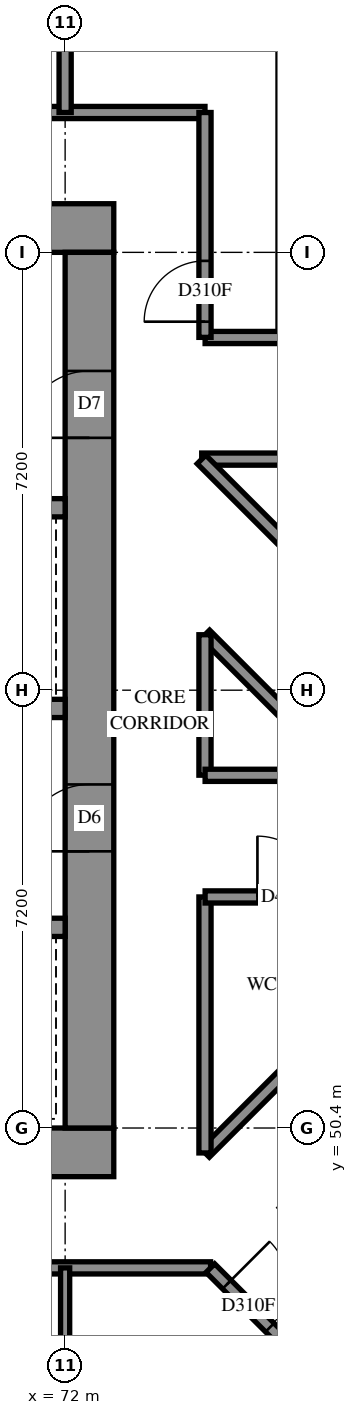
"""IFC4 building model, lengths in metres.
Left out: names, types, materials, properties, quantities, classifications, styles, units other than length and angle.
Written with IfcOpenShell. Run it as: python <this file> out.ifc"""

import sys

from ifc_helpers import new_model, si_unit, direction, frame, frame_2d, origin, place, context, subcontext, project, spatial, rectangle, extrude, element, fill, save


model = new_model("IFC4")
c1 = context("Model", 3, precision=1e-05, world=origin(), true_north=direction((0.0, 1.0)))
c2 = subcontext(c1, "Body", "Model", "MODEL_VIEW")
j1 = project(units=[si_unit("LENGTHUNIT", "METRE"), si_unit("PLANEANGLEUNIT", "RADIAN")], contexts=[c1])
p1 = place(None, origin())
s1 = spatial("IfcSite", under=j1, at=p1, CompositionType="ELEMENT")
p2 = place(p1, origin())
s2 = spatial("IfcBuilding", under=s1, at=p2, CompositionType="ELEMENT")
p3 = place(p2, frame((0.0, 0.0, 101.6)))
s3 = spatial("IfcBuildingStorey", under=s2, at=p3, CompositionType="ELEMENT", Elevation=101.6)
p4 = place(p3, frame((56.8, 50.0, -0.3), z_axis=(0.0, 0.0, 1.0), x_axis=(1.0, 0.0, 0.0)))
e1 = element("IfcWall", 1, at=p4, inside=s3, PredefinedType="SHEAR", context=c2, shape_type="SweptSolid", body=[
    extrude(rectangle(XDim=16.0, YDim=0.8, at=frame_2d((8.0, 0.0))), origin(), (0.0, 0.0, 1.0), 2.7),
])
p5 = place(p3, frame((56.8, 65.2, -0.3), z_axis=(0.0, 0.0, 1.0), x_axis=(1.0, 0.0, 0.0)))
e2 = element("IfcWall", 2, at=p5, inside=s3, PredefinedType="SHEAR", context=c2, shape_type="SweptSolid", body=[
    extrude(rectangle(XDim=16.0, YDim=0.8, at=frame_2d((8.0, 0.0))), origin(), (0.0, 0.0, 1.0), 2.7),
])
p6 = place(p5, frame((10.8, 0.0, 0.3)))
e3 = element("IfcOpeningElement", 3, at=p6, cuts=e2, PredefinedType="OPENING", context=c2, shape_type="SweptSolid", body=[
    extrude(rectangle(XDim=0.8, YDim=2.1, at=frame_2d((0.4, 1.05))), frame((0.0, 0.41, 0.0), z_axis=(0.0, -1.0, 0.0), x_axis=(1.0, 0.0, 0.0)), (0.0, 0.0, 1.0), 0.82),
])
p7 = place(p3, frame((72.4, 50.4, -0.3), z_axis=(0.0, 0.0, 1.0), x_axis=(0.0, 1.0, 0.0)))
e4 = element("IfcWall", 4, at=p7, inside=s3, PredefinedType="SHEAR", context=c2, shape_type="SweptSolid", body=[
    extrude(rectangle(XDim=14.4, YDim=0.8, at=frame_2d((7.2, 0.0))), origin(), (0.0, 0.0, 1.0), 2.7),
])
p8 = place(p7, frame((4.55, 0.0, 0.3)))
e5 = element("IfcOpeningElement", 5, at=p8, cuts=e4, PredefinedType="OPENING", context=c2, shape_type="SweptSolid", body=[
    extrude(rectangle(XDim=1.1, YDim=2.1, at=frame_2d((0.55, 1.05))), frame((0.0, 0.41, 0.0), z_axis=(0.0, -1.0, 0.0), x_axis=(1.0, 0.0, 0.0)), (0.0, 0.0, 1.0), 0.82),
])
p9 = place(p7, frame((11.35, 0.0, 0.3)))
e6 = element("IfcOpeningElement", 6, at=p9, cuts=e4, PredefinedType="OPENING", context=c2, shape_type="SweptSolid", body=[
    extrude(rectangle(XDim=1.1, YDim=2.1, at=frame_2d((0.55, 1.05))), frame((0.0, 0.41, 0.0), z_axis=(0.0, -1.0, 0.0), x_axis=(1.0, 0.0, 0.0)), (0.0, 0.0, 1.0), 0.82),
])
p10 = place(p3, frame((57.6, 53.7, 0.0), z_axis=(0.0, 0.0, 1.0), x_axis=(1.0, 0.0, 0.0)))
e7 = element("IfcWall", 7, at=p10, inside=s3, PredefinedType="SOLIDWALL", context=c2, shape_type="SweptSolid", body=[
    extrude(rectangle(XDim=14.4, YDim=0.3, at=frame_2d((7.2, 0.0))), origin(), (0.0, 0.0, 1.0), 3.1),
])
p11 = place(p10, frame((1.25, 0.0, 0.0)))
e8 = element("IfcOpeningElement", 8, at=p11, cuts=e7, PredefinedType="OPENING", context=c2, shape_type="SweptSolid", body=[
    extrude(rectangle(XDim=1.1, YDim=2.1, at=frame_2d((0.55, 1.05))), frame((0.0, 0.16, 0.0), z_axis=(0.0, -1.0, 0.0), x_axis=(1.0, 0.0, 0.0)), (0.0, 0.0, 1.0), 0.32),
])
p12 = place(p10, frame((4.85, 0.0, 0.0)))
e9 = element("IfcOpeningElement", 9, at=p12, cuts=e7, PredefinedType="OPENING", context=c2, shape_type="SweptSolid", body=[
    extrude(rectangle(XDim=1.1, YDim=2.1, at=frame_2d((0.55, 1.05))), frame((0.0, 0.16, 0.0), z_axis=(0.0, -1.0, 0.0), x_axis=(1.0, 0.0, 0.0)), (0.0, 0.0, 1.0), 0.32),
])
p13 = place(p10, frame((8.45, 0.0, 0.0)))
e10 = element("IfcOpeningElement", 10, at=p13, cuts=e7, PredefinedType="OPENING", context=c2, shape_type="SweptSolid", body=[
    extrude(rectangle(XDim=1.1, YDim=2.1, at=frame_2d((0.55, 1.05))), frame((0.0, 0.16, 0.0), z_axis=(0.0, -1.0, 0.0), x_axis=(1.0, 0.0, 0.0)), (0.0, 0.0, 1.0), 0.32),
])
p14 = place(p10, frame((12.05, 0.0, 0.0)))
e11 = element("IfcOpeningElement", 11, at=p14, cuts=e7, PredefinedType="OPENING", context=c2, shape_type="SweptSolid", body=[
    extrude(rectangle(XDim=1.1, YDim=2.1, at=frame_2d((0.55, 1.05))), frame((0.0, 0.16, 0.0), z_axis=(0.0, -1.0, 0.0), x_axis=(1.0, 0.0, 0.0)), (0.0, 0.0, 1.0), 0.32),
])
p15 = place(p3, frame((57.6, 57.3, 0.0), z_axis=(0.0, 0.0, 1.0), x_axis=(1.0, 0.0, 0.0)))
e12 = element("IfcWall", 12, at=p15, inside=s3, PredefinedType="SOLIDWALL", context=c2, shape_type="SweptSolid", body=[
    extrude(rectangle(XDim=14.4, YDim=0.3, at=frame_2d((7.2, 0.0))), origin(), (0.0, 0.0, 1.0), 3.1),
])
p16 = place(p15, frame((12.05, 0.0, 0.0)))
e13 = element("IfcOpeningElement", 13, at=p16, cuts=e12, PredefinedType="OPENING", context=c2, shape_type="SweptSolid", body=[
    extrude(rectangle(XDim=1.1, YDim=2.1, at=frame_2d((0.55, 1.05))), frame((0.0, 0.16, 0.0), z_axis=(0.0, -1.0, 0.0), x_axis=(1.0, 0.0, 0.0)), (0.0, 0.0, 1.0), 0.32),
])
p17 = place(p3, frame((64.8, 60.6, 0.0), z_axis=(0.0, 0.0, 1.0), x_axis=(1.0, 0.0, 0.0)))
e14 = element("IfcWall", 14, at=p17, inside=s3, PredefinedType="SOLIDWALL", context=c2, shape_type="SweptSolid", body=[
    extrude(rectangle(XDim=7.2, YDim=0.3, at=frame_2d((3.6, 0.0))), origin(), (0.0, 0.0, 1.0), 3.1),
])
p18 = place(p3, frame((55.3, 48.1, 0.0), z_axis=(0.0, 0.0, 1.0), x_axis=(1.0, 0.0, 0.0)))
e15 = element("IfcWall", 15, at=p18, inside=s3, PredefinedType="PARTITIONING", context=c2, shape_type="SweptSolid", body=[
    extrude(rectangle(XDim=19.092, YDim=0.2, at=frame_2d((9.546, 0.0))), origin(), (0.0, 0.0, 1.0), 3.1),
])
p19 = place(p18, frame((4.6, 0.0, 0.0)))
e16 = element("IfcOpeningElement", 16, at=p19, cuts=e15, PredefinedType="OPENING", context=c2, shape_type="SweptSolid", body=[
    extrude(rectangle(XDim=0.9, YDim=2.1, at=frame_2d((0.45, 1.05))), frame((0.0, 0.11, 0.0), z_axis=(0.0, -1.0, 0.0), x_axis=(1.0, 0.0, 0.0)), (0.0, 0.0, 1.0), 0.22),
])
p20 = place(p18, frame((8.239, 0.0, 0.0)))
e17 = element("IfcOpeningElement", 17, at=p20, cuts=e15, PredefinedType="OPENING", context=c2, shape_type="SweptSolid", body=[
    extrude(rectangle(XDim=0.9, YDim=2.1, at=frame_2d((0.45, 1.05))), frame((0.0, 0.11, 0.0), z_axis=(0.0, -1.0, 0.0), x_axis=(1.0, 0.0, 0.0)), (0.0, 0.0, 1.0), 0.22),
])
p21 = place(p18, frame((13.5, 0.0, 0.0)))
e18 = element("IfcOpeningElement", 18, at=p21, cuts=e15, PredefinedType="OPENING", context=c2, shape_type="SweptSolid", body=[
    extrude(rectangle(XDim=0.9, YDim=2.1, at=frame_2d((0.45, 1.05))), frame((0.0, 0.11, 0.0), z_axis=(0.0, -1.0, 0.0), x_axis=(1.0, 0.0, 0.0)), (0.0, 0.0, 1.0), 0.22),
])
p22 = place(p3, frame((55.3, 67.1, 0.0), z_axis=(0.0, 0.0, 1.0), x_axis=(1.0, 0.0, 0.0)))
e19 = element("IfcWall", 19, at=p22, inside=s3, PredefinedType="PARTITIONING", context=c2, shape_type="SweptSolid", body=[
    extrude(rectangle(XDim=19.0, YDim=0.2, at=frame_2d((9.5, 0.0))), origin(), (0.0, 0.0, 1.0), 3.1),
])
p23 = place(p22, frame((6.199, 0.0, 0.0)))
e20 = element("IfcOpeningElement", 20, at=p23, cuts=e19, PredefinedType="OPENING", context=c2, shape_type="SweptSolid", body=[
    extrude(rectangle(XDim=0.9, YDim=2.1, at=frame_2d((0.45, 1.05))), frame((0.0, 0.11, 0.0), z_axis=(0.0, -1.0, 0.0), x_axis=(1.0, 0.0, 0.0)), (0.0, 0.0, 1.0), 0.22),
])
p24 = place(p22, frame((13.399, 0.0, 0.0)))
e21 = element("IfcOpeningElement", 21, at=p24, cuts=e19, PredefinedType="OPENING", context=c2, shape_type="SweptSolid", body=[
    extrude(rectangle(XDim=0.9, YDim=2.1, at=frame_2d((0.45, 1.05))), frame((0.0, 0.11, 0.0), z_axis=(0.0, -1.0, 0.0), x_axis=(1.0, 0.0, 0.0)), (0.0, 0.0, 1.0), 0.22),
])
p25 = place(p3, frame((74.301, 49.991, 0.0), z_axis=(0.0, 0.0, 1.0), x_axis=(0.7071067812, 0.7071067812, 0.0)))
e22 = element("IfcWall", 22, at=p25, inside=s3, PredefinedType="PARTITIONING", context=c2, shape_type="SweptSolid", body=[
    extrude(rectangle(XDim=5.951, YDim=0.2, at=frame_2d((2.975, 0.0))), origin(), (0.0, 0.0, 1.0), 3.1),
])
p26 = place(p3, frame((74.246, 61.4, 0.0), z_axis=(0.0, 0.0, 1.0), x_axis=(1.0, 0.0, 0.0)))
e23 = element("IfcWall", 23, at=p26, inside=s3, PredefinedType="PARTITIONING", context=c2, shape_type="SweptSolid", body=[
    extrude(rectangle(XDim=4.954, YDim=0.2, at=frame_2d((2.477, 0.0))), origin(), (0.0, 0.0, 1.0), 3.1),
])
p27 = place(p3, frame((74.302, 63.4, 0.0), z_axis=(0.0, 0.0, 1.0), x_axis=(1.0, 0.0, 0.0)))
e24 = element("IfcWall", 24, at=p27, inside=s3, PredefinedType="PARTITIONING", context=c2, shape_type="SweptSolid", body=[
    extrude(rectangle(XDim=4.896, YDim=0.2, at=frame_2d((2.448, 0.0))), origin(), (0.0, 0.0, 1.0), 3.1),
])
p28 = place(p3, frame((74.243, 61.395, 0.0), z_axis=(0.0, 0.0, 1.0), x_axis=(0.7071067812, -0.7071067812, 0.0)))
e25 = element("IfcWall", 25, at=p28, inside=s3, PredefinedType="PARTITIONING", context=c2, shape_type="SweptSolid", body=[
    extrude(rectangle(XDim=4.528, YDim=0.2, at=frame_2d((2.264, 0.0))), origin(), (0.0, 0.0, 1.0), 3.1),
])
p29 = place(p28, frame((2.797, 0.0, 0.0)))
e26 = element("IfcOpeningElement", 26, at=p29, cuts=e25, PredefinedType="OPENING", context=c2, shape_type="SweptSolid", body=[
    extrude(rectangle(XDim=1.0, YDim=2.1, at=frame_2d((0.5, 1.05))), frame((0.0, 0.11, 0.0), z_axis=(0.0, -1.0, 0.0), x_axis=(1.0, 0.0, 0.0)), (0.0, 0.0, 1.0), 0.22),
])
p30 = place(p3, frame((74.388, 48.096, 0.0), z_axis=(0.0, 0.0, 1.0), x_axis=(0.7071067812, -0.7071067812, 0.0)))
e27 = element("IfcWall", 27, at=p30, inside=s3, PredefinedType="PARTITIONING", context=c2, shape_type="SweptSolid", body=[
    extrude(rectangle(XDim=4.452, YDim=0.2, at=frame_2d((2.226, 0.0))), origin(), (0.0, 0.0, 1.0), 3.1),
])
p31 = place(p30, frame((0.382, 0.0, 0.0)))
e28 = element("IfcOpeningElement", 28, at=p31, cuts=e27, PredefinedType="OPENING", context=c2, shape_type="SweptSolid", body=[
    extrude(rectangle(XDim=1.0, YDim=2.1, at=frame_2d((0.5, 1.05))), frame((0.0, 0.11, 0.0), z_axis=(0.0, -1.0, 0.0), x_axis=(1.0, 0.0, 0.0)), (0.0, 0.0, 1.0), 0.22),
])
p32 = place(p3, frame((72.0, 67.1, 0.0), z_axis=(0.0, 0.0, 1.0), x_axis=(0.0, 1.0, 0.0)))
e29 = element("IfcWall", 29, at=p32, inside=s3, PredefinedType="PARTITIONING", context=c2, shape_type="SweptSolid", body=[
    extrude(rectangle(XDim=4.4, YDim=0.2, at=frame_2d((2.2, 0.0))), origin(), (0.0, 0.0, 1.0), 3.1),
])
p33 = place(p3, frame((74.3, 49.99, 0.0), z_axis=(0.0, 0.0, 1.0), x_axis=(0.0, 1.0, 0.0)))
e30 = element("IfcWall", 30, at=p33, inside=s3, PredefinedType="PARTITIONING", context=c2, shape_type="SweptSolid", body=[
    extrude(rectangle(XDim=4.21, YDim=0.2, at=frame_2d((2.105, 0.0))), origin(), (0.0, 0.0, 1.0), 3.1),
])
p34 = place(p3, frame((74.302, 54.2, 0.0), z_axis=(0.0, 0.0, 1.0), x_axis=(1.0, 0.0, 0.0)))
e31 = element("IfcWall", 31, at=p34, inside=s3, PredefinedType="PARTITIONING", context=c2, shape_type="SweptSolid", body=[
    extrude(rectangle(XDim=4.208, YDim=0.2, at=frame_2d((2.104, 0.0))), origin(), (0.0, 0.0, 1.0), 3.1),
])
p35 = place(p34, frame((0.86, 0.0, 0.0)))
e32 = element("IfcOpeningElement", 32, at=p35, cuts=e31, PredefinedType="OPENING", context=c2, shape_type="SweptSolid", body=[
    extrude(rectangle(XDim=1.0, YDim=2.1, at=frame_2d((0.5, 1.05))), frame((0.0, 0.11, 0.0), z_axis=(0.0, -1.0, 0.0), x_axis=(1.0, 0.0, 0.0)), (0.0, 0.0, 1.0), 0.22),
])
p36 = place(p3, frame((74.3, 63.402, 0.0), z_axis=(0.0, 0.0, 1.0), x_axis=(0.0, 1.0, 0.0)))
e33 = element("IfcWall", 33, at=p36, inside=s3, PredefinedType="PARTITIONING", context=c2, shape_type="SweptSolid", body=[
    extrude(rectangle(XDim=3.698, YDim=0.2, at=frame_2d((1.849, 0.0))), origin(), (0.0, 0.0, 1.0), 3.1),
])
p37 = place(p36, frame((0.258, 0.0, 0.0)))
e34 = element("IfcOpeningElement", 34, at=p37, cuts=e33, PredefinedType="OPENING", context=c2, shape_type="SweptSolid", body=[
    extrude(rectangle(XDim=1.0, YDim=2.1, at=frame_2d((0.5, 1.05))), frame((0.0, 0.11, 0.0), z_axis=(0.0, -1.0, 0.0), x_axis=(1.0, 0.0, 0.0)), (0.0, 0.0, 1.0), 0.22),
])
p38 = place(p3, frame((74.305, 58.517, 0.0), z_axis=(0.0, 0.0, 1.0), x_axis=(0.7071067812, -0.7071067812, 0.0)))
e35 = element("IfcWall", 35, at=p38, inside=s3, PredefinedType="PARTITIONING", context=c2, shape_type="SweptSolid", body=[
    extrude(rectangle(XDim=3.27, YDim=0.2, at=frame_2d((1.635, 0.0))), origin(), (0.0, 0.0, 1.0), 3.1),
])
p39 = place(p3, frame((72.0, 45.7, 0.0), z_axis=(0.0, 0.0, 1.0), x_axis=(0.0, 1.0, 0.0)))
e36 = element("IfcWall", 36, at=p39, inside=s3, PredefinedType="PARTITIONING", context=c2, shape_type="SweptSolid", body=[
    extrude(rectangle(XDim=2.4, YDim=0.15, at=frame_2d((1.2, 0.0))), origin(), (0.0, 0.0, 1.0), 3.1),
])
for number, where, z_axis, x_axis in (
    (37, (74.3, 56.202, 0.0), (0.0, 0.0, 1.0), (0.0, 1.0, 0.0)),
    (38, (74.302, 56.2, 0.0), (0.0, 0.0, 1.0), (1.0, 0.0, 0.0)),
):
    element("IfcWall", number, at=place(p3, frame(where, z_axis=z_axis, x_axis=x_axis)), inside=s3, PredefinedType="PARTITIONING", context=c2, shape_type="SweptSolid", body=[
        extrude(rectangle(XDim=2.31, YDim=0.2, at=frame_2d((1.155, 0.0))), origin(), (0.0, 0.0, 1.0), 3.1),
    ])
p40 = place(p8, origin())
e39 = element("IfcDoor", 39, at=p40, inside=s3, OperationType="DOUBLE_DOOR_SINGLE_SWING", PredefinedType="DOOR", context=c2, shape_type="SweptSolid", body=[
    extrude(rectangle(XDim=1.1, YDim=2.1, at=frame_2d((0.55, 1.05))), frame((0.0, 0.025, 0.0), z_axis=(0.0, -1.0, 0.0), x_axis=(1.0, 0.0, 0.0)), (0.0, 0.0, 1.0), 0.05),
])
fill(e5, e39)
p41 = place(p9, origin())
e40 = element("IfcDoor", 40, at=p41, inside=s3, OperationType="SINGLE_SWING_RIGHT", PredefinedType="DOOR", context=c2, shape_type="SweptSolid", body=[
    extrude(rectangle(XDim=1.1, YDim=2.1, at=frame_2d((0.55, 1.05))), frame((0.0, 0.025, 0.0), z_axis=(0.0, -1.0, 0.0), x_axis=(1.0, 0.0, 0.0)), (0.0, 0.0, 1.0), 0.05),
])
fill(e6, e40)
p42 = place(p35, origin())
e41 = element("IfcDoor", 41, at=p42, inside=s3, OperationType="SINGLE_SWING_RIGHT", PredefinedType="DOOR", context=c2, shape_type="SweptSolid", body=[
    extrude(rectangle(XDim=1.0, YDim=2.1, at=frame_2d((0.5, 1.05))), frame((0.0, 0.025, 0.0), z_axis=(0.0, -1.0, 0.0), x_axis=(1.0, 0.0, 0.0)), (0.0, 0.0, 1.0), 0.05),
])
fill(e32, e41)
p43 = place(p37, origin())
e42 = element("IfcDoor", 42, at=p43, inside=s3, OperationType="SINGLE_SWING_RIGHT", PredefinedType="DOOR", context=c2, shape_type="SweptSolid", body=[
    extrude(rectangle(XDim=1.0, YDim=2.1, at=frame_2d((0.5, 1.05))), frame((0.0, 0.025, 0.0), z_axis=(0.0, -1.0, 0.0), x_axis=(1.0, 0.0, 0.0)), (0.0, 0.0, 1.0), 0.05),
])
fill(e34, e42)
p44 = place(p31, origin())
e43 = element("IfcDoor", 43, at=p44, inside=s3, OperationType="SINGLE_SWING_LEFT", PredefinedType="DOOR", context=c2, shape_type="SweptSolid", body=[
    extrude(rectangle(XDim=1.0, YDim=2.1, at=frame_2d((0.5, 1.05))), frame((0.0, 0.025, 0.0), z_axis=(0.0, -1.0, 0.0), x_axis=(1.0, 0.0, 0.0)), (0.0, 0.0, 1.0), 0.05),
])
fill(e28, e43)
save(model, sys.argv[1])
